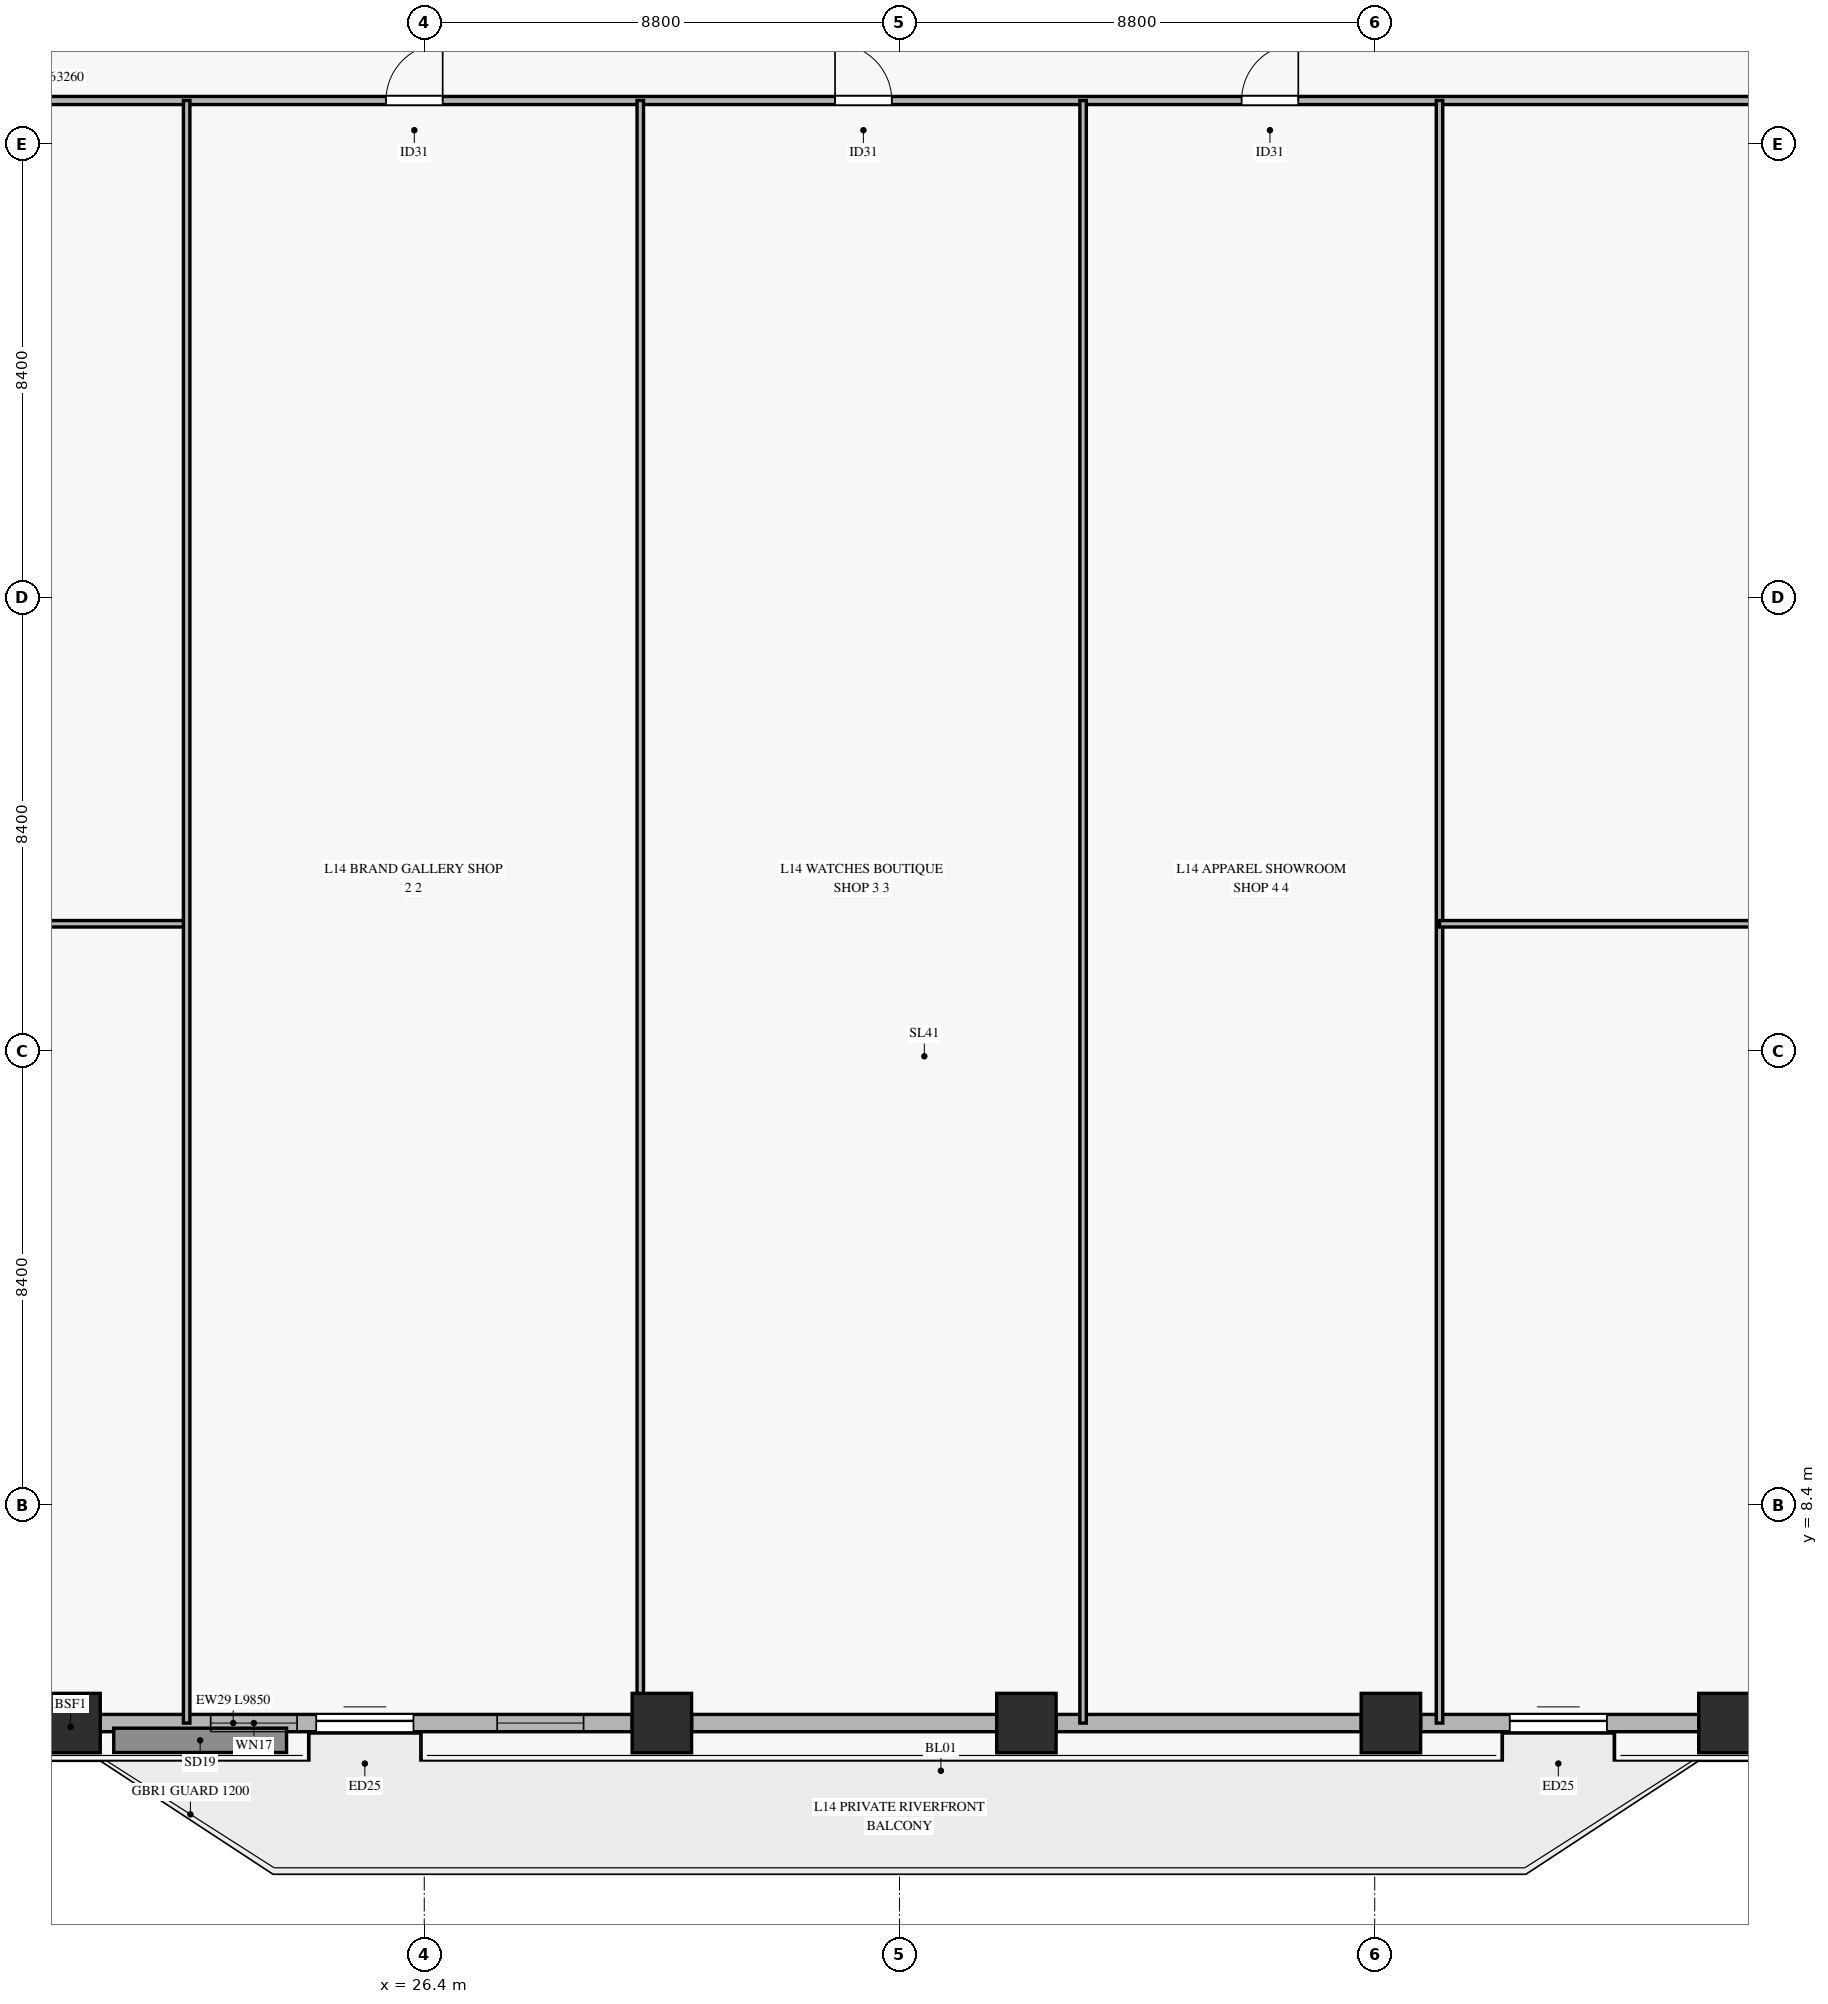
"""IFC4 building model, lengths in metres.
Left out: names, types, materials, properties, quantities, classifications, styles, units other than length and angle.
Written with IfcOpenShell. Run it as: python <this file> out.ifc"""

import sys

from ifc_helpers import new_model, si_unit, direction, frame, frame_2d, origin, origin_2d, place, context, subcontext, project, spatial, rectangle, hollow_rectangle, extrude, source, transform, mapped, element, fill, save


model = new_model("IFC4")
c1 = context("Model", 3, precision=1e-05, world=origin(), true_north=direction((0.0, 1.0)))
c2 = subcontext(c1, "Body", "Model", "MODEL_VIEW")
j1 = project(units=[si_unit("LENGTHUNIT", "METRE"), si_unit("PLANEANGLEUNIT", "RADIAN")], contexts=[c1])
p1 = place(None, origin())
s1 = spatial("IfcSite", under=j1, at=p1, CompositionType="ELEMENT")
p2 = place(p1, origin())
s2 = spatial("IfcBuilding", under=s1, at=p2, CompositionType="ELEMENT")
p3 = place(p2, frame((0.0, 0.0, 57.2)))
s3 = spatial("IfcBuildingStorey", under=s2, at=p3, CompositionType="ELEMENT", Elevation=57.2)
m1 = source(origin(), c2, "Body", "SweptSolid", [
    extrude(hollow_rectangle(XDim=1.1, YDim=1.1, WallThickness=0.05, at=origin_2d()), origin(), (0.0, 0.0, 1.0), 3.718),
])
for number, where, z_axis, x_axis in (
    (1, (19.85, 4.354, 0.0), (0.0, 0.142, 0.99), (-1.0, 0.0, 0.0)),
    (2, (30.8, 4.354, 0.0), (0.0, 0.142, 0.99), (-1.0, 0.0, 0.0)),
    (3, (37.55, 4.354, 0.0), (0.0, 0.142, 0.99), (-1.0, 0.0, 0.0)),
    (4, (44.3, 4.354, 0.0), (0.0, 0.142, 0.99), (-1.0, 0.0, 0.0)),
    (5, (50.55, 4.354, 0.0), (0.0, 0.142, 0.99), (-1.0, 0.0, 0.0)),
):
    element("IfcColumn", number, at=place(p3, frame(where, z_axis=z_axis, x_axis=x_axis)), inside=s3, PredefinedType="COLUMN", context=c2, shape_type="MappedRepresentation", body=[
        mapped(m1, transform((0.0, 0.0, 0.0), x_axis=(1.0, 0.0, 0.0), y_axis=(0.0, 1.0, 0.0), z_axis=(0.0, 0.0, 1.0), scale=1.0)),
    ])
p4 = place(p3, frame((20.4, 4.354, 0.0), z_axis=(0.0, 0.0, 1.0), x_axis=(1.0, 0.0, 0.0)))
e6 = element("IfcWall", 6, at=p4, inside=s3, PredefinedType="SOLIDWALL", context=c2, shape_type="SweptSolid", body=[
    extrude(rectangle(XDim=9.85, YDim=0.32, at=frame_2d((4.925, 0.0))), origin(), (0.0, 0.0, 1.0), 3.16),
])
p5 = place(p4, frame((4.0, 0.0, 0.0)))
e7 = element("IfcOpeningElement", 7, at=p5, cuts=e6, PredefinedType="OPENING", context=c2, shape_type="SweptSolid", body=[
    extrude(rectangle(XDim=1.8, YDim=2.25, at=frame_2d((0.9, 1.125))), frame((0.0, 0.17, 0.0), z_axis=(0.0, -1.0, 0.0), x_axis=(1.0, 0.0, 0.0)), (0.0, 0.0, 1.0), 0.34),
])
p6 = place(p4, frame((2.045, 0.0, 0.45)))
e8 = element("IfcOpeningElement", 8, at=p6, cuts=e6, PredefinedType="OPENING", context=c2, shape_type="SweptSolid", body=[
    extrude(rectangle(XDim=1.6, YDim=2.0, at=frame_2d((0.8, 1.0))), frame((0.0, 0.17, 0.0), z_axis=(0.0, -1.0, 0.0), x_axis=(1.0, 0.0, 0.0)), (0.0, 0.0, 1.0), 0.34),
])
p7 = place(p4, frame((7.35, 0.0, 0.45)))
e9 = element("IfcOpeningElement", 9, at=p7, cuts=e6, PredefinedType="OPENING", context=c2, shape_type="SweptSolid", body=[
    extrude(rectangle(XDim=1.6, YDim=2.0, at=frame_2d((0.8, 1.0))), frame((0.0, 0.17, 0.0), z_axis=(0.0, -1.0, 0.0), x_axis=(1.0, 0.0, 0.0)), (0.0, 0.0, 1.0), 0.34),
])
for number, where, z_axis, x_axis in (
    (10, (31.35, 4.354, 0.0), (0.0, 0.0, 1.0), (1.0, 0.0, 0.0)),
    (11, (38.1, 4.354, 0.0), (0.0, 0.0, 1.0), (1.0, 0.0, 0.0)),
):
    element("IfcWall", number, at=place(p3, frame(where, z_axis=z_axis, x_axis=x_axis)), inside=s3, PredefinedType="SOLIDWALL", context=c2, shape_type="SweptSolid", body=[
        extrude(rectangle(XDim=5.65, YDim=0.32, at=frame_2d((2.825, 0.0))), origin(), (0.0, 0.0, 1.0), 3.16),
    ])
p8 = place(p3, frame((44.85, 4.354, 0.0), z_axis=(0.0, 0.0, 1.0), x_axis=(1.0, 0.0, 0.0)))
e12 = element("IfcWall", 12, at=p8, inside=s3, PredefinedType="SOLIDWALL", context=c2, shape_type="SweptSolid", body=[
    extrude(rectangle(XDim=5.15, YDim=0.32, at=frame_2d((2.575, 0.0))), origin(), (0.0, 0.0, 1.0), 3.16),
])
p9 = place(p8, frame((1.65, 0.0, 0.0)))
e13 = element("IfcOpeningElement", 13, at=p9, cuts=e12, PredefinedType="OPENING", context=c2, shape_type="SweptSolid", body=[
    extrude(rectangle(XDim=1.8, YDim=2.25, at=frame_2d((0.9, 1.125))), frame((0.0, 0.17, 0.0), z_axis=(0.0, -1.0, 0.0), x_axis=(1.0, 0.0, 0.0)), (0.0, 0.0, 1.0), 0.34),
])
p10 = place(p3, frame((3.57, 34.4, 0.0), z_axis=(0.0, 0.0, 1.0), x_axis=(1.0, 0.0, 0.0)))
e14 = element("IfcWall", 14, at=p10, inside=s3, PredefinedType="PARTITIONING", context=c2, shape_type="SweptSolid", body=[
    extrude(rectangle(XDim=63.26, YDim=0.15, at=frame_2d((31.63, 0.0))), origin(), (0.0, 0.0, 1.0), 2.765),
])
p11 = place(p10, frame((7.799, 0.0, 0.0)))
e15 = element("IfcOpeningElement", 15, at=p11, cuts=e14, PredefinedType="OPENING", context=c2, shape_type="SweptSolid", body=[
    extrude(rectangle(XDim=1.05, YDim=2.15, at=frame_2d((0.525, 1.075))), frame((0.0, 0.085, 0.0), z_axis=(0.0, -1.0, 0.0), x_axis=(1.0, 0.0, 0.0)), (0.0, 0.0, 1.0), 0.17),
])
p12 = place(p10, frame((22.121, 0.0, 0.0)))
e16 = element("IfcOpeningElement", 16, at=p12, cuts=e14, PredefinedType="OPENING", context=c2, shape_type="SweptSolid", body=[
    extrude(rectangle(XDim=1.05, YDim=2.15, at=frame_2d((0.525, 1.075))), frame((0.0, 0.085, 0.0), z_axis=(0.0, -1.0, 0.0), x_axis=(1.0, 0.0, 0.0)), (0.0, 0.0, 1.0), 0.17),
])
p13 = place(p10, frame((30.437, 0.0, 0.0)))
e17 = element("IfcOpeningElement", 17, at=p13, cuts=e14, PredefinedType="OPENING", context=c2, shape_type="SweptSolid", body=[
    extrude(rectangle(XDim=1.05, YDim=2.15, at=frame_2d((0.525, 1.075))), frame((0.0, 0.085, 0.0), z_axis=(0.0, -1.0, 0.0), x_axis=(1.0, 0.0, 0.0)), (0.0, 0.0, 1.0), 0.17),
])
p14 = place(p10, frame((37.965, 0.0, 0.0)))
e18 = element("IfcOpeningElement", 18, at=p14, cuts=e14, PredefinedType="OPENING", context=c2, shape_type="SweptSolid", body=[
    extrude(rectangle(XDim=1.05, YDim=2.15, at=frame_2d((0.525, 1.075))), frame((0.0, 0.085, 0.0), z_axis=(0.0, -1.0, 0.0), x_axis=(1.0, 0.0, 0.0)), (0.0, 0.0, 1.0), 0.17),
])
p15 = place(p10, frame((50.274, 0.0, 0.0)))
e19 = element("IfcOpeningElement", 19, at=p15, cuts=e14, PredefinedType="OPENING", context=c2, shape_type="SweptSolid", body=[
    extrude(rectangle(XDim=1.05, YDim=2.15, at=frame_2d((0.525, 1.075))), frame((0.0, 0.085, 0.0), z_axis=(0.0, -1.0, 0.0), x_axis=(1.0, 0.0, 0.0)), (0.0, 0.0, 1.0), 0.17),
])
p16 = place(p3, frame((3.57, 19.155, 0.0), z_axis=(0.0, 0.0, 1.0), x_axis=(1.0, 0.0, 0.0)))
e20 = element("IfcWall", 20, at=p16, inside=s3, PredefinedType="PARTITIONING", context=c2, shape_type="SweptSolid", body=[
    extrude(rectangle(XDim=18.43, YDim=0.12, at=frame_2d((9.215, 0.0))), origin(), (0.0, 0.0, 1.0), 2.765),
])
p17 = place(p16, frame((8.156, 0.0, 0.0)))
e21 = element("IfcOpeningElement", 21, at=p17, cuts=e20, PredefinedType="OPENING", context=c2, shape_type="SweptSolid", body=[
    extrude(rectangle(XDim=0.95, YDim=2.1, at=frame_2d((0.475, 1.05))), frame((0.0, 0.07, 0.0), z_axis=(0.0, -1.0, 0.0), x_axis=(1.0, 0.0, 0.0)), (0.0, 0.0, 1.0), 0.14),
])
p18 = place(p3, frame((22.0, 4.354, 0.0), z_axis=(0.0, 0.0, 1.0), x_axis=(0.0, 1.0, 0.0)))
e22 = element("IfcWall", 22, at=p18, inside=s3, PredefinedType="PARTITIONING", context=c2, shape_type="SweptSolid", body=[
    extrude(rectangle(XDim=30.046, YDim=0.12, at=frame_2d((15.023, 0.0))), origin(), (0.0, 0.0, 1.0), 3.165),
])
p19 = place(p3, frame((30.4, 4.354, 0.0), z_axis=(0.0, 0.0, 1.0), x_axis=(0.0, 1.0, 0.0)))
e23 = element("IfcWall", 23, at=p19, inside=s3, PredefinedType="PARTITIONING", context=c2, shape_type="SweptSolid", body=[
    extrude(rectangle(XDim=30.046, YDim=0.12, at=frame_2d((15.023, 0.0))), origin(), (0.0, 0.0, 1.0), 3.215),
])
for number, where, z_axis, x_axis in (
    (24, (38.6, 4.354, 0.0), (0.0, 0.0, 1.0), (0.0, 1.0, 0.0)),
    (25, (45.2, 4.354, 0.0), (0.0, 0.0, 1.0), (0.0, 1.0, 0.0)),
):
    element("IfcWall", number, at=place(p3, frame(where, z_axis=z_axis, x_axis=x_axis)), inside=s3, PredefinedType="PARTITIONING", context=c2, shape_type="SweptSolid", body=[
        extrude(rectangle(XDim=30.046, YDim=0.12, at=frame_2d((15.023, 0.0))), origin(), (0.0, 0.0, 1.0), 3.165),
    ])
p20 = place(p3, frame((45.2, 19.155, 0.0), z_axis=(0.0, 0.0, 1.0), x_axis=(1.0, 0.0, 0.0)))
e26 = element("IfcWall", 26, at=p20, inside=s3, PredefinedType="PARTITIONING", context=c2, shape_type="SweptSolid", body=[
    extrude(rectangle(XDim=21.63, YDim=0.12, at=frame_2d((10.815, 0.0))), origin(), (0.0, 0.0, 1.0), 2.765),
])
p21 = place(p20, frame((9.065, 0.0, 0.0)))
e27 = element("IfcOpeningElement", 27, at=p21, cuts=e26, PredefinedType="OPENING", context=c2, shape_type="SweptSolid", body=[
    extrude(rectangle(XDim=0.95, YDim=2.1, at=frame_2d((0.475, 1.05))), frame((0.0, 0.07, 0.0), z_axis=(0.0, -1.0, 0.0), x_axis=(1.0, 0.0, 0.0)), (0.0, 0.0, 1.0), 0.14),
])
m2 = source(origin(), c2, "Body", "SweptSolid", [
    extrude(rectangle(XDim=1.8, YDim=2.25, at=frame_2d((0.9, 1.125))), frame((0.0, 0.025, 0.0), z_axis=(0.0, -1.0, 0.0), x_axis=(1.0, 0.0, 0.0)), (0.0, 0.0, 1.0), 0.05),
])
p22 = place(p5, origin())
e28 = element("IfcDoor", 28, at=p22, inside=s3, OperationType="SLIDING_TO_LEFT", PredefinedType="DOOR", context=c2, shape_type="MappedRepresentation", body=[
    mapped(m2, transform((0.0, 0.0, 0.0), x_axis=(1.0, 0.0, 0.0), y_axis=(0.0, 1.0, 0.0), z_axis=(0.0, 0.0, 1.0), scale=1.0)),
])
fill(e7, e28)
m3 = source(origin(), c2, "Body", "SweptSolid", [
    extrude(rectangle(XDim=1.6, YDim=2.0, at=frame_2d((0.8, 1.0))), frame((0.0, 0.03, 0.0), z_axis=(0.0, -1.0, 0.0), x_axis=(1.0, 0.0, 0.0)), (0.0, 0.0, 1.0), 0.06),
])
p23 = place(p6, origin())
e29 = element("IfcWindow", 29, at=p23, inside=s3, PartitioningType="SINGLE_PANEL", PredefinedType="WINDOW", context=c2, shape_type="MappedRepresentation", body=[
    mapped(m3, transform((0.0, 0.0, 0.0), x_axis=(1.0, 0.0, 0.0), y_axis=(0.0, 1.0, 0.0), z_axis=(0.0, 0.0, 1.0), scale=1.0)),
])
fill(e8, e29)
p24 = place(p7, origin())
e30 = element("IfcWindow", 30, at=p24, inside=s3, PartitioningType="SINGLE_PANEL", PredefinedType="WINDOW", context=c2, shape_type="MappedRepresentation", body=[
    mapped(m3, transform((0.0, 0.0, 0.0), x_axis=(1.0, 0.0, 0.0), y_axis=(0.0, 1.0, 0.0), z_axis=(0.0, 0.0, 1.0), scale=1.0)),
])
fill(e9, e30)
p25 = place(p9, origin())
e31 = element("IfcDoor", 31, at=p25, inside=s3, OperationType="SLIDING_TO_LEFT", PredefinedType="DOOR", context=c2, shape_type="MappedRepresentation", body=[
    mapped(m2, transform((0.0, 0.0, 0.0), x_axis=(1.0, 0.0, 0.0), y_axis=(0.0, 1.0, 0.0), z_axis=(0.0, 0.0, 1.0), scale=1.0)),
])
fill(e13, e31)
m4 = source(origin(), c2, "Body", "SweptSolid", [
    extrude(rectangle(XDim=1.05, YDim=2.15, at=frame_2d((0.525, 1.075))), frame((0.0, 0.025, 0.0), z_axis=(0.0, -1.0, 0.0), x_axis=(1.0, 0.0, 0.0)), (0.0, 0.0, 1.0), 0.05),
])
p26 = place(p12, origin())
e32 = element("IfcDoor", 32, at=p26, inside=s3, OperationType="SINGLE_SWING_RIGHT", PredefinedType="DOOR", context=c2, shape_type="MappedRepresentation", body=[
    mapped(m4, transform((0.0, 0.0, 0.0), x_axis=(1.0, 0.0, 0.0), y_axis=(0.0, 1.0, 0.0), z_axis=(0.0, 0.0, 1.0), scale=1.0)),
])
fill(e16, e32)
p27 = place(p13, origin())
e33 = element("IfcDoor", 33, at=p27, inside=s3, OperationType="SINGLE_SWING_LEFT", PredefinedType="DOOR", context=c2, shape_type="MappedRepresentation", body=[
    mapped(m4, transform((0.0, 0.0, 0.0), x_axis=(1.0, 0.0, 0.0), y_axis=(0.0, 1.0, 0.0), z_axis=(0.0, 0.0, 1.0), scale=1.0)),
])
fill(e17, e33)
p28 = place(p14, origin())
e34 = element("IfcDoor", 34, at=p28, inside=s3, OperationType="SINGLE_SWING_RIGHT", PredefinedType="DOOR", context=c2, shape_type="MappedRepresentation", body=[
    mapped(m4, transform((0.0, 0.0, 0.0), x_axis=(1.0, 0.0, 0.0), y_axis=(0.0, 1.0, 0.0), z_axis=(0.0, 0.0, 1.0), scale=1.0)),
])
fill(e18, e34)
save(model, sys.argv[1])
